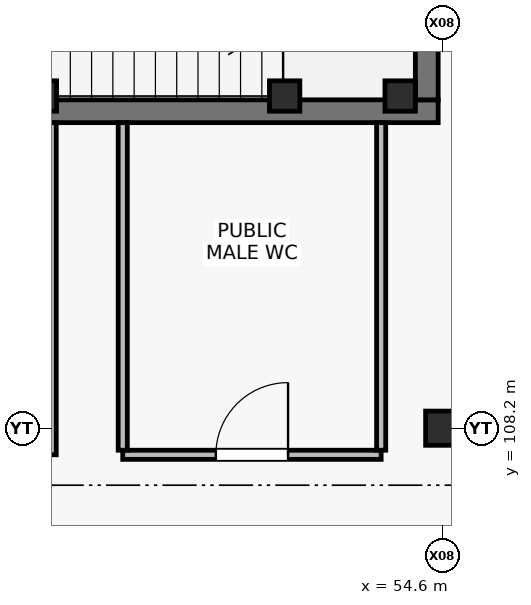
"""IFC4 building model, lengths in metres.
Left out: names, types, materials, properties, quantities, classifications, styles, units other than length and angle.
Written with IfcOpenShell. Run it as: python <this file> out.ifc"""

import sys

from ifc_helpers import new_model, si_unit, direction, frame, frame_2d, origin, origin_2d, place, context, subcontext, project, spatial, rectangle, extrude, element, fill, save


model = new_model("IFC4")
c1 = context("Model", 3, precision=1e-05, world=origin(), true_north=direction((0.0, 1.0)))
c2 = subcontext(c1, "Body", "Model", "MODEL_VIEW")
j1 = project(units=[si_unit("LENGTHUNIT", "METRE"), si_unit("PLANEANGLEUNIT", "RADIAN")], contexts=[c1])
p1 = place(None, origin())
s1 = spatial("IfcSite", under=j1, at=p1, CompositionType="ELEMENT")
p2 = place(p1, origin())
s2 = spatial("IfcBuilding", under=s1, at=p2, CompositionType="ELEMENT")
p3 = place(p2, frame((0.0, 0.0, 18.6)))
s3 = spatial("IfcBuildingStorey", under=s2, at=p3, CompositionType="ELEMENT", Elevation=18.6)
p4 = place(p3, frame((54.6, 108.2, 0.0), z_axis=(0.0, 0.0, 1.0), x_axis=(1.0, 0.0, 0.0)))
e1 = element("IfcColumn", 1, at=p4, inside=s3, PredefinedType="COLUMN", context=c2, shape_type="SweptSolid", body=[
    extrude(rectangle(XDim=0.45, YDim=0.45, at=origin_2d()), origin(), (0.0, 0.0, 1.0), 4.5),
])
for number, where, z_axis, x_axis in (
    (2, (49.32, 112.57, 0.0), (0.0, 0.0, 1.0), (1.0, 0.0, 0.0)),
    (3, (52.52, 112.57, 0.0), (0.0, 0.0, 1.0), (1.0, 0.0, 0.0)),
    (4, (54.04, 112.57, 0.0), (0.0, 0.0, 1.0), (1.0, 0.0, 0.0)),
):
    element("IfcColumn", number, at=place(p3, frame(where, z_axis=z_axis, x_axis=x_axis)), inside=s3, PredefinedType="COLUMN", context=c2, shape_type="SweptSolid", body=[
        extrude(rectangle(XDim=0.4, YDim=0.4, at=origin_2d()), origin(), (0.0, 0.0, 1.0), 4.5),
    ])
p5 = place(p3, frame((46.95, 112.37, 0.0), z_axis=(0.0, 0.0, 1.0), x_axis=(1.0, 0.0, 0.0)))
e5 = element("IfcWall", 5, at=p5, inside=s3, PredefinedType="SHEAR", context=c2, shape_type="SweptSolid", body=[
    extrude(rectangle(XDim=7.59, YDim=0.3, at=frame_2d((3.795, 0.0))), origin(), (0.0, 0.0, 1.0), 4.26),
])
p6 = place(p5, frame((0.59, 0.0, 0.0)))
e6 = element("IfcOpeningElement", 6, at=p6, cuts=e5, PredefinedType="OPENING", context=c2, shape_type="SweptSolid", body=[
    extrude(rectangle(XDim=1.4, YDim=2.2, at=frame_2d((0.7, 1.1))), frame((0.0, 0.16, 0.0), z_axis=(0.0, -1.0, 0.0), x_axis=(1.0, 0.0, 0.0)), (0.0, 0.0, 1.0), 0.32),
])
p7 = place(p3, frame((54.39, 112.52, 0.0), z_axis=(0.0, 0.0, 1.0), x_axis=(0.0, 1.0, 0.0)))
e7 = element("IfcWall", 7, at=p7, inside=s3, PredefinedType="SHEAR", context=c2, shape_type="SweptSolid", body=[
    extrude(rectangle(XDim=3.33, YDim=0.3, at=frame_2d((1.665, 0.0))), origin(), (0.0, 0.0, 1.0), 4.26),
])
p8 = place(p3, frame((49.44, 107.85, 0.0), z_axis=(0.0, 0.0, 1.0), x_axis=(0.0, 1.0, 0.0)))
e8 = element("IfcWall", 8, at=p8, inside=s3, PredefinedType="PARTITIONING", context=c2, shape_type="SweptSolid", body=[
    extrude(rectangle(XDim=4.37, YDim=0.15, at=frame_2d((2.185, 0.0))), origin(), (0.0, 0.0, 1.0), 4.26),
])
p9 = place(p3, frame((50.39, 107.85, 0.0), z_axis=(0.0, 0.0, 1.0), x_axis=(1.0, 0.0, 0.0)))
e9 = element("IfcWall", 9, at=p9, inside=s3, PredefinedType="PARTITIONING", context=c2, shape_type="SweptSolid", body=[
    extrude(rectangle(XDim=3.4, YDim=0.12, at=frame_2d((1.7, 0.0))), origin(), (0.0, 0.0, 1.0), 3.72),
])
p10 = place(p9, frame((1.225, 0.0, 0.0)))
e10 = element("IfcOpeningElement", 10, at=p10, cuts=e9, PredefinedType="OPENING", context=c2, shape_type="SweptSolid", body=[
    extrude(rectangle(XDim=0.95, YDim=2.1, at=frame_2d((0.475, 1.05))), frame((0.0, 0.07, 0.0), z_axis=(0.0, -1.0, 0.0), x_axis=(1.0, 0.0, 0.0)), (0.0, 0.0, 1.0), 0.14),
])
for number, where, z_axis, x_axis in (
    (11, (50.39, 107.91, 0.0), (0.0, 0.0, 1.0), (0.0, 1.0, 0.0)),
    (12, (53.79, 107.91, 0.0), (0.0, 0.0, 1.0), (0.0, 1.0, 0.0)),
):
    element("IfcWall", number, at=place(p3, frame(where, z_axis=z_axis, x_axis=x_axis)), inside=s3, PredefinedType="PARTITIONING", context=c2, shape_type="SweptSolid", body=[
        extrude(rectangle(XDim=4.31, YDim=0.12, at=frame_2d((2.155, 0.0))), origin(), (0.0, 0.0, 1.0), 4.26),
    ])
p11 = place(p10, origin())
e13 = element("IfcDoor", 13, at=p11, inside=s3, OperationType="SINGLE_SWING_RIGHT", PredefinedType="DOOR", context=c2, shape_type="SweptSolid", body=[
    extrude(rectangle(XDim=0.95, YDim=2.1, at=frame_2d((0.475, 1.05))), frame((0.0, 0.025, 0.0), z_axis=(0.0, -1.0, 0.0), x_axis=(1.0, 0.0, 0.0)), (0.0, 0.0, 1.0), 0.05),
])
fill(e10, e13)
save(model, sys.argv[1])
